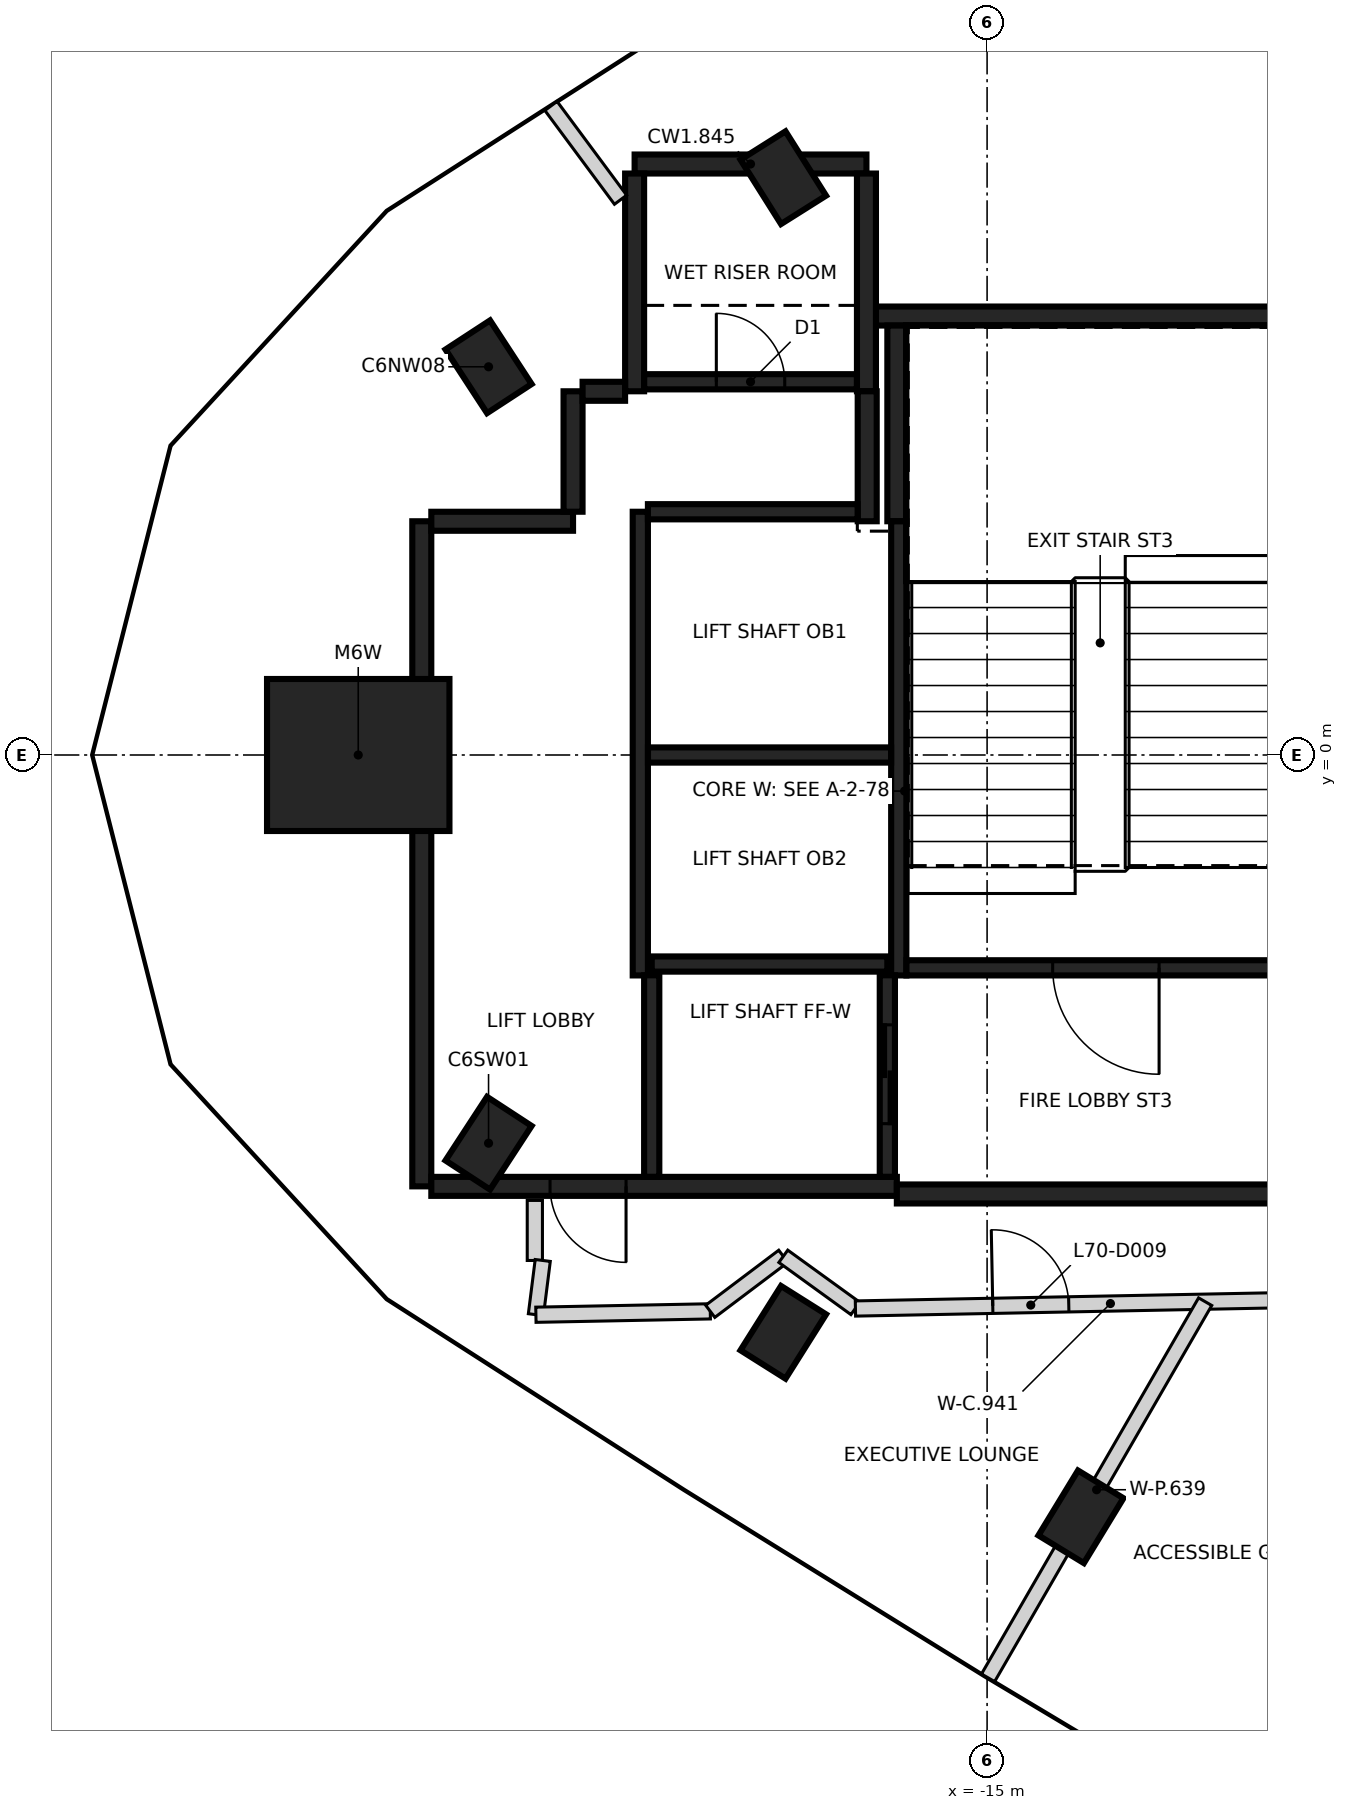
"""IFC4 building model, lengths in metres.
Left out: names, types, materials, properties, quantities, classifications, styles, units other than length and angle.
Written with IfcOpenShell. Run it as: python <this file> out.ifc"""

import sys

from ifc_helpers import new_model, si_unit, direction, frame, frame_2d, origin, origin_2d, place, context, subcontext, project, spatial, rectangle, extrude, element, fill, save


model = new_model("IFC4")
c1 = context("Model", 3, precision=1e-05, world=origin(), true_north=direction((0.0, 1.0)))
c2 = subcontext(c1, "Body", "Model", "MODEL_VIEW")
j1 = project(units=[si_unit("LENGTHUNIT", "METRE"), si_unit("PLANEANGLEUNIT", "RADIAN")], contexts=[c1])
p1 = place(None, origin())
s1 = spatial("IfcSite", under=j1, at=p1, CompositionType="ELEMENT")
p2 = place(p1, origin())
s2 = spatial("IfcBuilding", under=s1, at=p2, CompositionType="ELEMENT")
p3 = place(p2, frame((0.0, 0.0, 276.6)))
s3 = spatial("IfcBuildingStorey", under=s2, at=p3, CompositionType="ELEMENT", Elevation=276.6)
for number, where, z_axis, x_axis in (
    (1, (-17.681, 7.595, -0.35), (0.0, 0.0, 1.0), (-0.533, 0.846, 0.0)),
    (2, (-21.559, 5.107, -0.35), (0.0, 0.0, 1.0), (-0.547, 0.837, 0.0)),
    (3, (-21.559, -5.107, -0.35), (0.0, 0.0, 1.0), (0.547, 0.837, 0.0)),
    (4, (-17.681, -7.595, -0.35), (0.0, 0.0, 1.0), (0.533, 0.846, 0.0)),
    (5, (-13.765, -10.022, -0.35), (0.0, 0.0, 1.0), (0.52, 0.854, 0.0)),
):
    element("IfcColumn", number, at=place(p3, frame(where, z_axis=z_axis, x_axis=x_axis)), inside=s3, PredefinedType="COLUMN", context=c2, shape_type="SweptSolid", body=[
        extrude(rectangle(XDim=1.0, YDim=0.7, at=origin_2d()), origin(), (0.0, 0.0, 1.0), 3.6),
    ])
p4 = place(p3, frame((-23.273, 0.0, -0.35), z_axis=(0.0, 0.0, 1.0), x_axis=(1.0, 0.0, 0.0)))
e6 = element("IfcColumn", 6, at=p4, inside=s3, PredefinedType="COLUMN", context=c2, shape_type="SweptSolid", body=[
    extrude(rectangle(XDim=2.4, YDim=2.0, at=origin_2d()), origin(), (0.0, 0.0, 1.0), 3.6),
])
p5 = place(p3, frame((-22.437, -5.675, 0.0), z_axis=(0.0, 0.0, 1.0), x_axis=(0.0, 1.0, 0.0)))
e7 = element("IfcWall", 7, at=p5, inside=s3, PredefinedType="SHEAR", context=c2, shape_type="SweptSolid", body=[
    extrude(rectangle(XDim=8.75, YDim=0.25, at=frame_2d((4.375, 0.0))), origin(), (0.0, 0.0, 1.0), 3.25),
])
p6 = place(p3, frame((-16.187, -5.675, 0.0), z_axis=(0.0, 0.0, 1.0), x_axis=(-1.0, 0.0, 0.0)))
e8 = element("IfcWall", 8, at=p6, inside=s3, PredefinedType="SHEAR", context=c2, shape_type="SweptSolid", body=[
    extrude(rectangle(XDim=6.125, YDim=0.25, at=frame_2d((3.062, 0.0))), origin(), (0.0, 0.0, 1.0), 3.25),
])
p7 = place(p6, frame((3.563, 0.0, 0.0)))
e9 = element("IfcOpeningElement", 9, at=p7, cuts=e8, PredefinedType="OPENING", context=c2, shape_type="SweptSolid", body=[
    extrude(rectangle(XDim=1.0, YDim=2.1, at=frame_2d((0.5, 1.05))), frame((0.0, 0.135, 0.0), z_axis=(0.0, -1.0, 0.0), x_axis=(1.0, 0.0, 0.0)), (0.0, 0.0, 1.0), 0.27),
])
p8 = place(p3, frame((-10.963, -5.775, 0.0), z_axis=(0.0, 0.0, 1.0), x_axis=(-1.0, 0.0, 0.0)))
e10 = element("IfcWall", 10, at=p8, inside=s3, PredefinedType="SHEAR", context=c2, shape_type="SweptSolid", body=[
    extrude(rectangle(XDim=5.225, YDim=0.25, at=frame_2d((2.612, 0.0))), origin(), (0.0, 0.0, 1.0), 3.25),
])
p9 = place(p3, frame((-16.472, 5.775, 0.0), z_axis=(0.0, 0.0, 1.0), x_axis=(1.0, 0.0, 0.0)))
e11 = element("IfcWall", 11, at=p9, inside=s3, PredefinedType="SHEAR", context=c2, shape_type="SweptSolid", body=[
    extrude(rectangle(XDim=5.51, YDim=0.25, at=frame_2d((2.755, 0.0))), origin(), (0.0, 0.0, 1.0), 3.25),
])
p10 = place(p3, frame((-19.637, 7.775, 0.0), z_axis=(0.0, 0.0, 1.0), x_axis=(1.0, 0.0, 0.0)))
e12 = element("IfcWall", 12, at=p10, inside=s3, PredefinedType="SHEAR", context=c2, shape_type="SweptSolid", body=[
    extrude(rectangle(XDim=3.05, YDim=0.25, at=frame_2d((1.525, 0.0))), origin(), (0.0, 0.0, 1.0), 3.25),
])
for number, where, z_axis, x_axis in (
    (13, (-16.587, 7.65, 0.0), (0.0, 0.0, 1.0), (0.0, -1.0, 0.0)),
    (14, (-19.637, 4.785, 0.0), (0.0, 0.0, 1.0), (0.0, 1.0, 0.0)),
):
    element("IfcWall", number, at=place(p3, frame(where, z_axis=z_axis, x_axis=x_axis)), inside=s3, PredefinedType="SHEAR", context=c2, shape_type="SweptSolid", body=[
        extrude(rectangle(XDim=2.865, YDim=0.25, at=frame_2d((1.432, 0.0))), origin(), (0.0, 0.0, 1.0), 3.25),
    ])
p11 = place(p3, frame((-16.187, 3.075, 0.0), z_axis=(0.0, 0.0, 1.0), x_axis=(0.0, 1.0, 0.0)))
e15 = element("IfcWall", 15, at=p11, inside=s3, PredefinedType="SHEAR", context=c2, shape_type="SweptSolid", body=[
    extrude(rectangle(XDim=2.575, YDim=0.25, at=frame_2d((1.287, 0.0))), origin(), (0.0, 0.0, 1.0), 3.25),
])
p12 = place(p3, frame((-22.312, 3.075, 0.0), z_axis=(0.0, 0.0, 1.0), x_axis=(1.0, 0.0, 0.0)))
e16 = element("IfcWall", 16, at=p12, inside=s3, PredefinedType="SHEAR", context=c2, shape_type="SweptSolid", body=[
    extrude(rectangle(XDim=1.865, YDim=0.25, at=frame_2d((0.932, 0.0))), origin(), (0.0, 0.0, 1.0), 3.25),
])
p13 = place(p3, frame((-16.577, 4.785, 0.0), z_axis=(0.0, 0.0, 1.0), x_axis=(0.0, -1.0, 0.0)))
e17 = element("IfcWall", 17, at=p13, inside=s3, PredefinedType="SHEAR", context=c2, shape_type="SweptSolid", body=[
    extrude(rectangle(XDim=1.71, YDim=0.25, at=frame_2d((0.855, 0.0))), origin(), (0.0, 0.0, 1.0), 3.25),
])
p14 = place(p3, frame((-20.447, 3.2, 0.0), z_axis=(0.0, 0.0, 1.0), x_axis=(0.0, 1.0, 0.0)))
e18 = element("IfcWall", 18, at=p14, inside=s3, PredefinedType="SHEAR", context=c2, shape_type="SweptSolid", body=[
    extrude(rectangle(XDim=1.584, YDim=0.25, at=frame_2d((0.792, 0.0))), origin(), (0.0, 0.0, 1.0), 3.25),
])
p15 = place(p3, frame((-20.322, 4.785, 0.0), z_axis=(0.0, 0.0, 1.0), x_axis=(1.0, 0.0, 0.0)))
e19 = element("IfcWall", 19, at=p15, inside=s3, PredefinedType="SHEAR", context=c2, shape_type="SweptSolid", body=[
    extrude(rectangle(XDim=0.559, YDim=0.25, at=frame_2d((0.28, 0.0))), origin(), (0.0, 0.0, 1.0), 3.25),
])
p16 = place(p3, frame((-16.162, 3.074, 0.0), z_axis=(0.0, 0.0, 1.0), x_axis=(0.0, -1.0, 0.0)))
e20 = element("IfcWall", 20, at=p16, inside=s3, PredefinedType="SHEAR", context=c2, shape_type="SweptSolid", body=[
    extrude(rectangle(XDim=5.974, YDim=0.2, at=frame_2d((2.987, 0.0))), origin(), (0.0, 0.0, 1.0), 3.25),
])
p17 = place(p3, frame((-19.562, -2.9, 0.0), z_axis=(0.0, 0.0, 1.0), x_axis=(0.0, 1.0, 0.0)))
e21 = element("IfcWall", 21, at=p17, inside=s3, PredefinedType="SHEAR", context=c2, shape_type="SweptSolid", body=[
    extrude(rectangle(XDim=6.1, YDim=0.2, at=frame_2d((3.05, 0.0))), origin(), (0.0, 0.0, 1.0), 3.25),
])
p18 = place(p3, frame((-10.963, -2.8, 0.0), z_axis=(0.0, 0.0, 1.0), x_axis=(-1.0, 0.0, 0.0)))
e22 = element("IfcWall", 22, at=p18, inside=s3, PredefinedType="SHEAR", context=c2, shape_type="SweptSolid", body=[
    extrude(rectangle(XDim=5.098, YDim=0.2, at=frame_2d((2.549, 0.0))), origin(), (0.0, 0.0, 1.0), 3.25),
])
p19 = place(p18, frame((1.774, 0.0, 0.0)))
e23 = element("IfcOpeningElement", 23, at=p19, cuts=e22, PredefinedType="OPENING", context=c2, shape_type="SweptSolid", body=[
    extrude(rectangle(XDim=1.4, YDim=2.1, at=frame_2d((0.7, 1.05))), frame((0.0, 0.11, 0.0), z_axis=(0.0, -1.0, 0.0), x_axis=(1.0, 0.0, 0.0)), (0.0, 0.0, 1.0), 0.22),
])
p20 = place(p3, frame((-16.263, 0.0, 0.0), z_axis=(0.0, 0.0, 1.0), x_axis=(-1.0, 0.0, 0.0)))
e24 = element("IfcWall", 24, at=p20, inside=s3, PredefinedType="SHEAR", context=c2, shape_type="SweptSolid", body=[
    extrude(rectangle(XDim=3.198, YDim=0.2, at=frame_2d((1.599, 0.0))), origin(), (0.0, 0.0, 1.0), 3.25),
])
p21 = place(p3, frame((-19.511, 4.91, 0.0), z_axis=(0.0, 0.0, 1.0), x_axis=(1.0, 0.0, 0.0)))
e25 = element("IfcWall", 25, at=p21, inside=s3, PredefinedType="SHEAR", context=c2, shape_type="SweptSolid", body=[
    extrude(rectangle(XDim=2.798, YDim=0.2, at=frame_2d((1.399, 0.0))), origin(), (0.0, 0.0, 1.0), 3.25),
])
p22 = place(p21, frame((0.949, 0.0, 0.0)))
e26 = element("IfcOpeningElement", 26, at=p22, cuts=e25, PredefinedType="OPENING", context=c2, shape_type="SweptSolid", body=[
    extrude(rectangle(XDim=0.9, YDim=2.1, at=frame_2d((0.45, 1.05))), frame((0.0, 0.11, 0.0), z_axis=(0.0, -1.0, 0.0), x_axis=(1.0, 0.0, 0.0)), (0.0, 0.0, 1.0), 0.22),
])
p23 = place(p3, frame((-19.462, 3.2, 0.0), z_axis=(0.0, 0.0, 1.0), x_axis=(1.0, 0.0, 0.0)))
e27 = element("IfcWall", 27, at=p23, inside=s3, PredefinedType="SHEAR", context=c2, shape_type="SweptSolid", body=[
    extrude(rectangle(XDim=2.759, YDim=0.2, at=frame_2d((1.379, 0.0))), origin(), (0.0, 0.0, 1.0), 3.25),
])
p24 = place(p3, frame((-19.412, -2.75, 0.0), z_axis=(0.0, 0.0, 1.0), x_axis=(1.0, 0.0, 0.0)))
e28 = element("IfcWall", 28, at=p24, inside=s3, PredefinedType="SHEAR", context=c2, shape_type="SweptSolid", body=[
    extrude(rectangle(XDim=3.1, YDim=0.2, at=frame_2d((1.55, 0.0))), origin(), (0.0, 0.0, 1.0), 3.25),
])
p25 = place(p3, frame((-16.312, -2.898, 0.0), z_axis=(0.0, 0.0, 1.0), x_axis=(0.0, -1.0, 0.0)))
e29 = element("IfcWall", 29, at=p25, inside=s3, PredefinedType="SHEAR", context=c2, shape_type="SweptSolid", body=[
    extrude(rectangle(XDim=2.651, YDim=0.2, at=frame_2d((1.325, 0.0))), origin(), (0.0, 0.0, 1.0), 3.25),
])
p26 = place(p25, frame((0.652, 0.0, 0.0)))
e30 = element("IfcOpeningElement", 30, at=p26, cuts=e29, PredefinedType="OPENING", context=c2, shape_type="SweptSolid", body=[
    extrude(rectangle(XDim=1.3, YDim=2.1, at=frame_2d((0.65, 1.05))), frame((0.0, 0.11, 0.0), z_axis=(0.0, -1.0, 0.0), x_axis=(1.0, 0.0, 0.0)), (0.0, 0.0, 1.0), 0.22),
])
p27 = place(p3, frame((-19.412, -5.549, 0.0), z_axis=(0.0, 0.0, 1.0), x_axis=(0.0, 1.0, 0.0)))
e31 = element("IfcWall", 31, at=p27, inside=s3, PredefinedType="SHEAR", context=c2, shape_type="SweptSolid", body=[
    extrude(rectangle(XDim=2.651, YDim=0.2, at=frame_2d((1.325, 0.0))), origin(), (0.0, 0.0, 1.0), 3.25),
])
p28 = place(p3, frame((-20.95, -6.65, 0.0), z_axis=(0.0, 0.0, 1.0), x_axis=(0.0, 1.0, 0.0)))
e32 = element("IfcWall", 32, at=p28, inside=s3, PredefinedType="PARTITIONING", context=c2, shape_type="SweptSolid", body=[
    extrude(rectangle(XDim=0.79, YDim=0.2, at=frame_2d((0.395, 0.0))), origin(), (0.0, 0.0, 1.0), 3.25),
])
p29 = place(p3, frame((-20.936, -7.363, 0.0), z_axis=(0.0, 0.0, 1.0), x_axis=(0.125330520795, 0.992115044013, 0.0)))
e33 = element("IfcWall", 33, at=p29, inside=s3, PredefinedType="PARTITIONING", context=c2, shape_type="SweptSolid", body=[
    extrude(rectangle(XDim=0.719, YDim=0.2, at=frame_2d((0.359, 0.0))), origin(), (0.0, 0.0, 1.0), 3.25),
])
p30 = place(p3, frame((-20.936, -7.364, 0.0), z_axis=(0.0, 0.0, 1.0), x_axis=(0.999810389391, 0.019472679998, 0.0)))
e34 = element("IfcWall", 34, at=p30, inside=s3, PredefinedType="PARTITIONING", context=c2, shape_type="SweptSolid", body=[
    extrude(rectangle(XDim=2.294, YDim=0.2, at=frame_2d((1.147, 0.0))), origin(), (0.0, 0.0, 1.0), 3.25),
])
p31 = place(p3, frame((-18.642, -7.319, 0.0), z_axis=(0.0, 0.0, 1.0), x_axis=(0.798707882989, 0.601718968998, 0.0)))
e35 = element("IfcWall", 35, at=p31, inside=s3, PredefinedType="PARTITIONING", context=c2, shape_type="SweptSolid", body=[
    extrude(rectangle(XDim=1.203, YDim=0.2, at=frame_2d((0.602, 0.0))), origin(), (0.0, 0.0, 1.0), 2.35),
])
p32 = place(p3, frame((-17.681, -6.595, 0.0), z_axis=(0.0, 0.0, 1.0), x_axis=(0.810123213102, -0.586259652026, 0.0)))
e36 = element("IfcWall", 36, at=p32, inside=s3, PredefinedType="PARTITIONING", context=c2, shape_type="SweptSolid", body=[
    extrude(rectangle(XDim=1.17, YDim=0.2, at=frame_2d((0.585, 0.0))), origin(), (0.0, 0.0, 1.0), 3.25),
])
p33 = place(p3, frame((-16.732, -7.282, 0.0), z_axis=(0.0, 0.0, 1.0), x_axis=(0.999809829903, 0.019501385329, 0.0)))
e37 = element("IfcWall", 37, at=p33, inside=s3, PredefinedType="PARTITIONING", context=c2, shape_type="SweptSolid", body=[
    extrude(rectangle(XDim=6.71, YDim=0.2, at=frame_2d((3.355, 0.0))), origin(), (0.0, 0.0, 1.0), 3.25),
])
p34 = place(p33, frame((1.807, 0.0, 0.0)))
e38 = element("IfcOpeningElement", 38, at=p34, cuts=e37, PredefinedType="OPENING", context=c2, shape_type="SweptSolid", body=[
    extrude(rectangle(XDim=1.0, YDim=2.1, at=frame_2d((0.5, 1.05))), frame((0.0, 0.11, 0.0), z_axis=(0.0, -1.0, 0.0), x_axis=(1.0, 0.0, 0.0)), (0.0, 0.0, 1.0), 0.22),
])
p35 = place(p33, frame((5.51, 0.0, 0.0)))
e39 = element("IfcOpeningElement", 39, at=p35, cuts=e37, PredefinedType="OPENING", context=c2, shape_type="SweptSolid", body=[
    extrude(rectangle(XDim=1.0, YDim=2.1, at=frame_2d((0.5, 1.05))), frame((0.0, 0.11, 0.0), z_axis=(0.0, -1.0, 0.0), x_axis=(1.0, 0.0, 0.0)), (0.0, 0.0, 1.0), 0.22),
])
p36 = place(p3, frame((-20.738, 8.539, 0.0), z_axis=(0.0, 0.0, 1.0), x_axis=(0.595694844153, -0.803210839475, 0.0)))
e40 = element("IfcWall", 40, at=p36, inside=s3, PredefinedType="PARTITIONING", context=c2, shape_type="SweptSolid", body=[
    extrude(rectangle(XDim=1.536, YDim=0.2, at=frame_2d((0.768, 0.0))), origin(), (0.0, 0.0, 1.0), 3.25),
])
p37 = place(p3, frame((-14.987, -12.14, 0.0), z_axis=(0.0, 0.0, 1.0), x_axis=(0.499912336857, 0.866076010208, 0.0)))
e41 = element("IfcWall", 41, at=p37, inside=s3, PredefinedType="PARTITIONING", context=c2, shape_type="SweptSolid", body=[
    extrude(rectangle(XDim=5.713, YDim=0.2, at=frame_2d((2.857, 0.0))), origin(), (0.0, 0.0, 1.0), 3.25),
])
p38 = place(p26, origin())
e42 = element("IfcDoor", 42, at=p38, inside=s3, OperationType="SLIDING_TO_RIGHT", PredefinedType="DOOR", context=c2, shape_type="SweptSolid", body=[
    extrude(rectangle(XDim=1.3, YDim=2.1, at=frame_2d((0.65, 1.05))), frame((0.0, 0.025, 0.0), z_axis=(0.0, -1.0, 0.0), x_axis=(1.0, 0.0, 0.0)), (0.0, 0.0, 1.0), 0.05),
])
fill(e30, e42)
p39 = place(p7, origin())
e43 = element("IfcDoor", 43, at=p39, inside=s3, OperationType="SINGLE_SWING_LEFT", PredefinedType="DOOR", context=c2, shape_type="SweptSolid", body=[
    extrude(rectangle(XDim=1.0, YDim=2.1, at=frame_2d((0.5, 1.05))), frame((0.0, 0.025, 0.0), z_axis=(0.0, -1.0, 0.0), x_axis=(1.0, 0.0, 0.0)), (0.0, 0.0, 1.0), 0.05),
])
fill(e9, e43)
p40 = place(p19, origin())
e44 = element("IfcDoor", 44, at=p40, inside=s3, OperationType="SINGLE_SWING_RIGHT", PredefinedType="DOOR", context=c2, shape_type="SweptSolid", body=[
    extrude(rectangle(XDim=1.4, YDim=2.1, at=frame_2d((0.7, 1.05))), frame((0.0, 0.025, 0.0), z_axis=(0.0, -1.0, 0.0), x_axis=(1.0, 0.0, 0.0)), (0.0, 0.0, 1.0), 0.05),
])
fill(e23, e44)
p41 = place(p22, origin())
e45 = element("IfcDoor", 45, at=p41, inside=s3, OperationType="SINGLE_SWING_LEFT", PredefinedType="DOOR", context=c2, shape_type="SweptSolid", body=[
    extrude(rectangle(XDim=0.9, YDim=2.1, at=frame_2d((0.45, 1.05))), frame((0.0, 0.025, 0.0), z_axis=(0.0, -1.0, 0.0), x_axis=(1.0, 0.0, 0.0)), (0.0, 0.0, 1.0), 0.05),
])
fill(e26, e45)
p42 = place(p34, origin())
e46 = element("IfcDoor", 46, at=p42, inside=s3, OperationType="SINGLE_SWING_LEFT", PredefinedType="DOOR", context=c2, shape_type="SweptSolid", body=[
    extrude(rectangle(XDim=1.0, YDim=2.1, at=frame_2d((0.5, 1.05))), frame((0.0, 0.025, 0.0), z_axis=(0.0, -1.0, 0.0), x_axis=(1.0, 0.0, 0.0)), (0.0, 0.0, 1.0), 0.05),
])
fill(e38, e46)
save(model, sys.argv[1])
